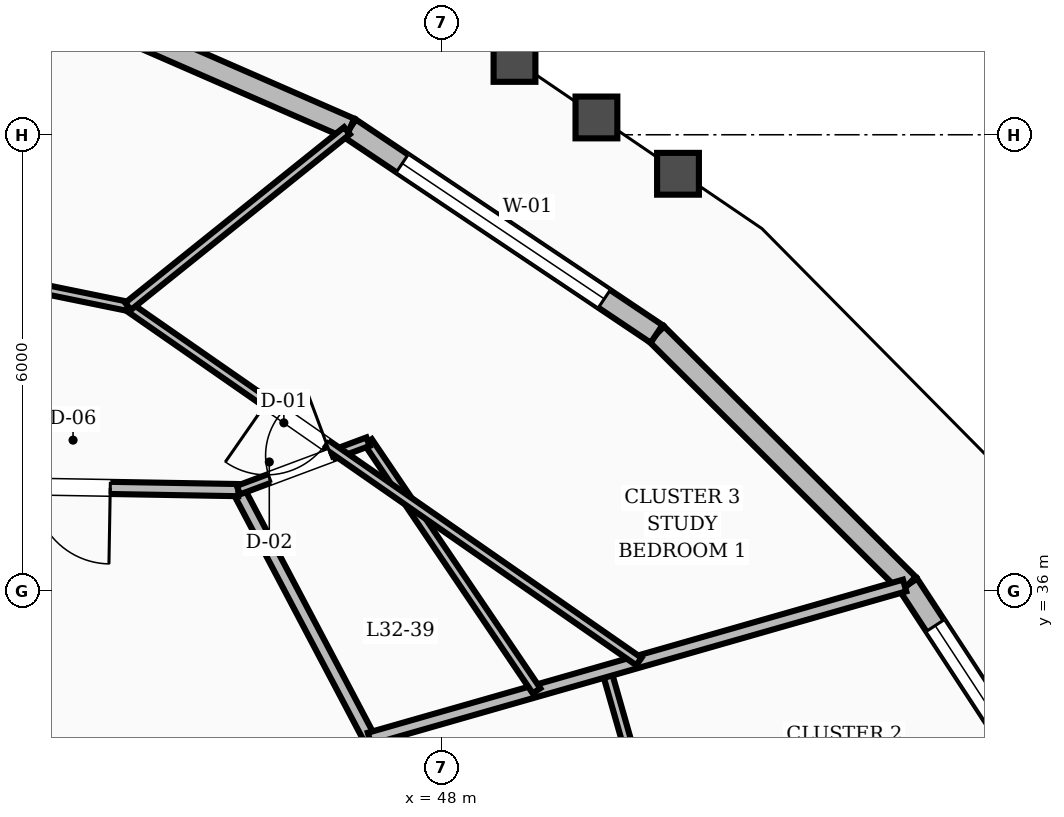
"""IFC4 building model, lengths in metres.
Left out: names, types, materials, properties, quantities, classifications, styles, units other than length and angle.
Written with IfcOpenShell. Run it as: python <this file> out.ifc"""

import sys

from ifc_helpers import new_model, si_unit, direction, frame, frame_2d, origin, place, context, subcontext, project, spatial, rectangle, extrude, element, fill, save


model = new_model("IFC4")
c1 = context("Model", 3, precision=1e-05, world=origin(), true_north=direction((0.0, 1.0)))
c2 = subcontext(c1, "Body", "Model", "MODEL_VIEW")
j1 = project(units=[si_unit("LENGTHUNIT", "METRE"), si_unit("PLANEANGLEUNIT", "RADIAN")], contexts=[c1])
p1 = place(None, origin())
s1 = spatial("IfcSite", under=j1, at=p1, CompositionType="ELEMENT")
p2 = place(p1, origin())
s2 = spatial("IfcBuilding", under=s1, at=p2, CompositionType="ELEMENT")
p3 = place(p2, frame((0.0, 0.0, 128.0)))
s3 = spatial("IfcBuildingStorey", under=s2, at=p3, CompositionType="ELEMENT", Elevation=128.0)
p4 = place(p3, frame((56.599, 32.323, 0.0), z_axis=(0.0, 0.0, 1.0), x_axis=(-0.547571349255, 0.836758996053, 0.0)))
e1 = element("IfcWall", 1, at=p4, inside=s3, PredefinedType="STANDARD", context=c2, shape_type="SweptSolid", body=[
    extrude(rectangle(XDim=4.494, YDim=0.28, at=frame_2d((2.247, 0.0))), origin(), (0.0, 0.0, 1.0), 2.82),
])
p5 = place(p4, frame((0.647, 0.0, 0.8)))
e2 = element("IfcOpeningElement", 2, at=p5, cuts=e1, PredefinedType="OPENING", context=c2, shape_type="SweptSolid", body=[
    extrude(rectangle(XDim=3.2, YDim=1.65, at=frame_2d((1.6, 0.825))), frame((0.0, 0.15, 0.0), z_axis=(0.0, -1.0, 0.0), x_axis=(1.0, 0.0, 0.0)), (0.0, 0.0, 1.0), 0.3),
])
p6 = place(p3, frame((54.138, 36.083, 0.0), z_axis=(0.0, 0.0, 1.0), x_axis=(-0.708724927863, 0.705484923032, 0.0)))
e3 = element("IfcWall", 3, at=p6, inside=s3, PredefinedType="STANDARD", context=c2, shape_type="SweptSolid", body=[
    extrude(rectangle(XDim=4.672, YDim=0.28, at=frame_2d((2.336, 0.0))), origin(), (0.0, 0.0, 1.0), 2.82),
])
p7 = place(p3, frame((50.827, 39.379, 0.0), z_axis=(0.0, 0.0, 1.0), x_axis=(-0.830609353865, 0.556855547941, 0.0)))
e4 = element("IfcWall", 4, at=p7, inside=s3, PredefinedType="STANDARD", context=c2, shape_type="SweptSolid", body=[
    extrude(rectangle(XDim=4.858, YDim=0.28, at=frame_2d((2.429, 0.0))), origin(), (0.0, 0.0, 1.0), 2.82),
])
p8 = place(p7, frame((0.829, 0.0, 0.8)))
e5 = element("IfcOpeningElement", 5, at=p8, cuts=e4, PredefinedType="OPENING", context=c2, shape_type="SweptSolid", body=[
    extrude(rectangle(XDim=3.2, YDim=1.65, at=frame_2d((1.6, 0.825))), frame((0.0, 0.15, 0.0), z_axis=(0.0, -1.0, 0.0), x_axis=(1.0, 0.0, 0.0)), (0.0, 0.0, 1.0), 0.3),
])
p9 = place(p3, frame((46.792, 42.084, 0.0), z_axis=(0.0, 0.0, 1.0), x_axis=(-0.916453831221, 0.400140444394, 0.0)))
e6 = element("IfcWall", 6, at=p9, inside=s3, PredefinedType="STANDARD", context=c2, shape_type="SweptSolid", body=[
    extrude(rectangle(XDim=5.023, YDim=0.28, at=frame_2d((2.511, 0.0))), origin(), (0.0, 0.0, 1.0), 2.82),
])
p10 = place(p3, frame((47.05, 34.056, 0.0), z_axis=(0.0, 0.0, 1.0), x_axis=(-0.466737093093, 0.884396113702, 0.0)))
e7 = element("IfcWall", 7, at=p10, inside=s3, PredefinedType="SOLIDWALL", context=c2, shape_type="SweptSolid", body=[
    extrude(rectangle(XDim=3.696, YDim=0.16, at=frame_2d((1.848, 0.0))), origin(), (0.0, 0.0, 1.0), 2.8),
])
p11 = place(p3, frame((45.325, 37.325, 0.0), z_axis=(0.0, 0.0, 1.0), x_axis=(-0.999853038912, 0.017143528788, 0.0)))
e8 = element("IfcWall", 8, at=p11, inside=s3, PredefinedType="SOLIDWALL", context=c2, shape_type="SweptSolid", body=[
    extrude(rectangle(XDim=4.372, YDim=0.16, at=frame_2d((2.186, 0.0))), origin(), (0.0, 0.0, 1.0), 2.8),
])
p12 = place(p11, frame((1.686, 0.0, 0.0)))
e9 = element("IfcOpeningElement", 9, at=p12, cuts=e8, PredefinedType="OPENING", context=c2, shape_type="SweptSolid", body=[
    extrude(rectangle(XDim=1.0, YDim=2.1, at=frame_2d((0.5, 1.05))), frame((0.0, 0.09, 0.0), z_axis=(0.0, -1.0, 0.0), x_axis=(1.0, 0.0, 0.0)), (0.0, 0.0, 1.0), 0.18),
])
p13 = place(p3, frame((51.251, 31.153, 0.0), z_axis=(0.0, 0.0, 1.0), x_axis=(-0.274312555961, 0.9616405886, 0.0)))
e10 = element("IfcWall", 10, at=p13, inside=s3, PredefinedType="PARTITIONING", context=c2, shape_type="SweptSolid", body=[
    extrude(rectangle(XDim=3.946, YDim=0.12, at=frame_2d((1.973, 0.0))), origin(), (0.0, 0.0, 1.0), 2.8),
])
p14 = place(p13, frame((1.498, 0.0, 0.0)))
e11 = element("IfcOpeningElement", 11, at=p14, cuts=e10, PredefinedType="OPENING", context=c2, shape_type="SweptSolid", body=[
    extrude(rectangle(XDim=0.95, YDim=2.1, at=frame_2d((0.475, 1.05))), frame((0.0, 0.07, 0.0), z_axis=(0.0, -1.0, 0.0), x_axis=(1.0, 0.0, 0.0)), (0.0, 0.0, 1.0), 0.14),
])
p15 = place(p3, frame((47.05, 34.056, 0.0), z_axis=(0.0, 0.0, 1.0), x_axis=(0.961443382808, 0.275002948446, 0.0)))
e12 = element("IfcWall", 12, at=p15, inside=s3, PredefinedType="SOLIDWALL", context=c2, shape_type="SweptSolid", body=[
    extrude(rectangle(XDim=7.322, YDim=0.16, at=frame_2d((3.661, 0.0))), origin(), (0.0, 0.0, 1.0), 2.8),
])
p16 = place(p3, frame((49.247, 34.685, 0.0), z_axis=(0.0, 0.0, 1.0), x_axis=(-0.560227188168, 0.828338999225, 0.0)))
e13 = element("IfcWall", 13, at=p16, inside=s3, PredefinedType="PARTITIONING", context=c2, shape_type="SweptSolid", body=[
    extrude(rectangle(XDim=3.957, YDim=0.12, at=frame_2d((1.978, 0.0))), origin(), (0.0, 0.0, 1.0), 2.8),
])
p17 = place(p3, frame((45.325, 37.325, 0.0), z_axis=(0.0, 0.0, 1.0), x_axis=(0.936818667413, 0.349815357561, 0.0)))
e14 = element("IfcWall", 14, at=p17, inside=s3, PredefinedType="PARTITIONING", context=c2, shape_type="SweptSolid", body=[
    extrude(rectangle(XDim=1.821, YDim=0.12, at=frame_2d((0.91, 0.0))), origin(), (0.0, 0.0, 1.0), 2.8),
])
p18 = place(p17, frame((0.44, 0.0, 0.0)))
e15 = element("IfcOpeningElement", 15, at=p18, cuts=e14, PredefinedType="OPENING", context=c2, shape_type="SweptSolid", body=[
    extrude(rectangle(XDim=0.86, YDim=2.1, at=frame_2d((0.43, 1.05))), frame((0.0, 0.07, 0.0), z_axis=(0.0, -1.0, 0.0), x_axis=(1.0, 0.0, 0.0)), (0.0, 0.0, 1.0), 0.14),
])
p19 = place(p3, frame((50.594, 35.07, 0.0), z_axis=(0.0, 0.0, 1.0), x_axis=(-0.821081459347, 0.570811034508, 0.0)))
e16 = element("IfcWall", 16, at=p19, inside=s3, PredefinedType="PARTITIONING", context=c2, shape_type="SweptSolid", body=[
    extrude(rectangle(XDim=8.186, YDim=0.12, at=frame_2d((4.093, 0.0))), origin(), (0.0, 0.0, 1.0), 2.8),
])
p20 = place(p19, frame((5.016, 0.0, 0.0)))
e17 = element("IfcOpeningElement", 17, at=p20, cuts=e16, PredefinedType="OPENING", context=c2, shape_type="SweptSolid", body=[
    extrude(rectangle(XDim=0.95, YDim=2.1, at=frame_2d((0.475, 1.05))), frame((0.0, 0.07, 0.0), z_axis=(0.0, -1.0, 0.0), x_axis=(1.0, 0.0, 0.0)), (0.0, 0.0, 1.0), 0.14),
])
p21 = place(p3, frame((43.873, 39.742, 0.0), z_axis=(0.0, 0.0, 1.0), x_axis=(-0.979737902763, 0.20028390322, 0.0)))
e18 = element("IfcWall", 18, at=p21, inside=s3, PredefinedType="PARTITIONING", context=c2, shape_type="SweptSolid", body=[
    extrude(rectangle(XDim=8.107, YDim=0.12, at=frame_2d((4.054, 0.0))), origin(), (0.0, 0.0, 1.0), 2.8),
])
p22 = place(p21, frame((3.579, 0.0, 0.0)))
e19 = element("IfcOpeningElement", 19, at=p22, cuts=e18, PredefinedType="OPENING", context=c2, shape_type="SweptSolid", body=[
    extrude(rectangle(XDim=0.95, YDim=2.1, at=frame_2d((0.475, 1.05))), frame((0.0, 0.07, 0.0), z_axis=(0.0, -1.0, 0.0), x_axis=(1.0, 0.0, 0.0)), (0.0, 0.0, 1.0), 0.14),
])
p23 = place(p3, frame((43.873, 39.742, 0.0), z_axis=(0.0, 0.0, 1.0), x_axis=(0.780010206727, 0.625766791547, 0.0)))
e20 = element("IfcWall", 20, at=p23, inside=s3, PredefinedType="PARTITIONING", context=c2, shape_type="SweptSolid", body=[
    extrude(rectangle(XDim=3.693, YDim=0.12, at=frame_2d((1.846, 0.0))), origin(), (0.0, 0.0, 1.0), 2.8),
])
p24 = place(p5, origin())
e21 = element("IfcWindow", 21, at=p24, inside=s3, PartitioningType="SINGLE_PANEL", PredefinedType="WINDOW", context=c2, shape_type="SweptSolid", body=[
    extrude(rectangle(XDim=3.2, YDim=1.65, at=frame_2d((1.6, 0.825))), frame((0.0, 0.03, 0.0), z_axis=(0.0, -1.0, 0.0), x_axis=(1.0, 0.0, 0.0)), (0.0, 0.0, 1.0), 0.06),
])
fill(e2, e21)
p25 = place(p8, origin())
e22 = element("IfcWindow", 22, at=p25, inside=s3, PartitioningType="SINGLE_PANEL", PredefinedType="WINDOW", context=c2, shape_type="SweptSolid", body=[
    extrude(rectangle(XDim=3.2, YDim=1.65, at=frame_2d((1.6, 0.825))), frame((0.0, 0.03, 0.0), z_axis=(0.0, -1.0, 0.0), x_axis=(1.0, 0.0, 0.0)), (0.0, 0.0, 1.0), 0.06),
])
fill(e5, e22)
p26 = place(p18, origin())
e23 = element("IfcDoor", 23, at=p26, inside=s3, OperationType="SINGLE_SWING_RIGHT", PredefinedType="DOOR", context=c2, shape_type="SweptSolid", body=[
    extrude(rectangle(XDim=0.86, YDim=2.1, at=frame_2d((0.43, 1.05))), frame((0.0, 0.025, 0.0), z_axis=(0.0, -1.0, 0.0), x_axis=(1.0, 0.0, 0.0)), (0.0, 0.0, 1.0), 0.05),
])
fill(e15, e23)
p27 = place(p12, origin())
e24 = element("IfcDoor", 24, at=p27, inside=s3, OperationType="SINGLE_SWING_LEFT", PredefinedType="DOOR", context=c2, shape_type="SweptSolid", body=[
    extrude(rectangle(XDim=1.0, YDim=2.1, at=frame_2d((0.5, 1.05))), frame((0.0, 0.025, 0.0), z_axis=(0.0, -1.0, 0.0), x_axis=(1.0, 0.0, 0.0)), (0.0, 0.0, 1.0), 0.05),
])
fill(e9, e24)
p28 = place(p20, origin())
e25 = element("IfcDoor", 25, at=p28, inside=s3, OperationType="SINGLE_SWING_RIGHT", PredefinedType="DOOR", context=c2, shape_type="SweptSolid", body=[
    extrude(rectangle(XDim=0.95, YDim=2.1, at=frame_2d((0.475, 1.05))), frame((0.0, 0.025, 0.0), z_axis=(0.0, -1.0, 0.0), x_axis=(1.0, 0.0, 0.0)), (0.0, 0.0, 1.0), 0.05),
])
fill(e17, e25)
save(model, sys.argv[1])
